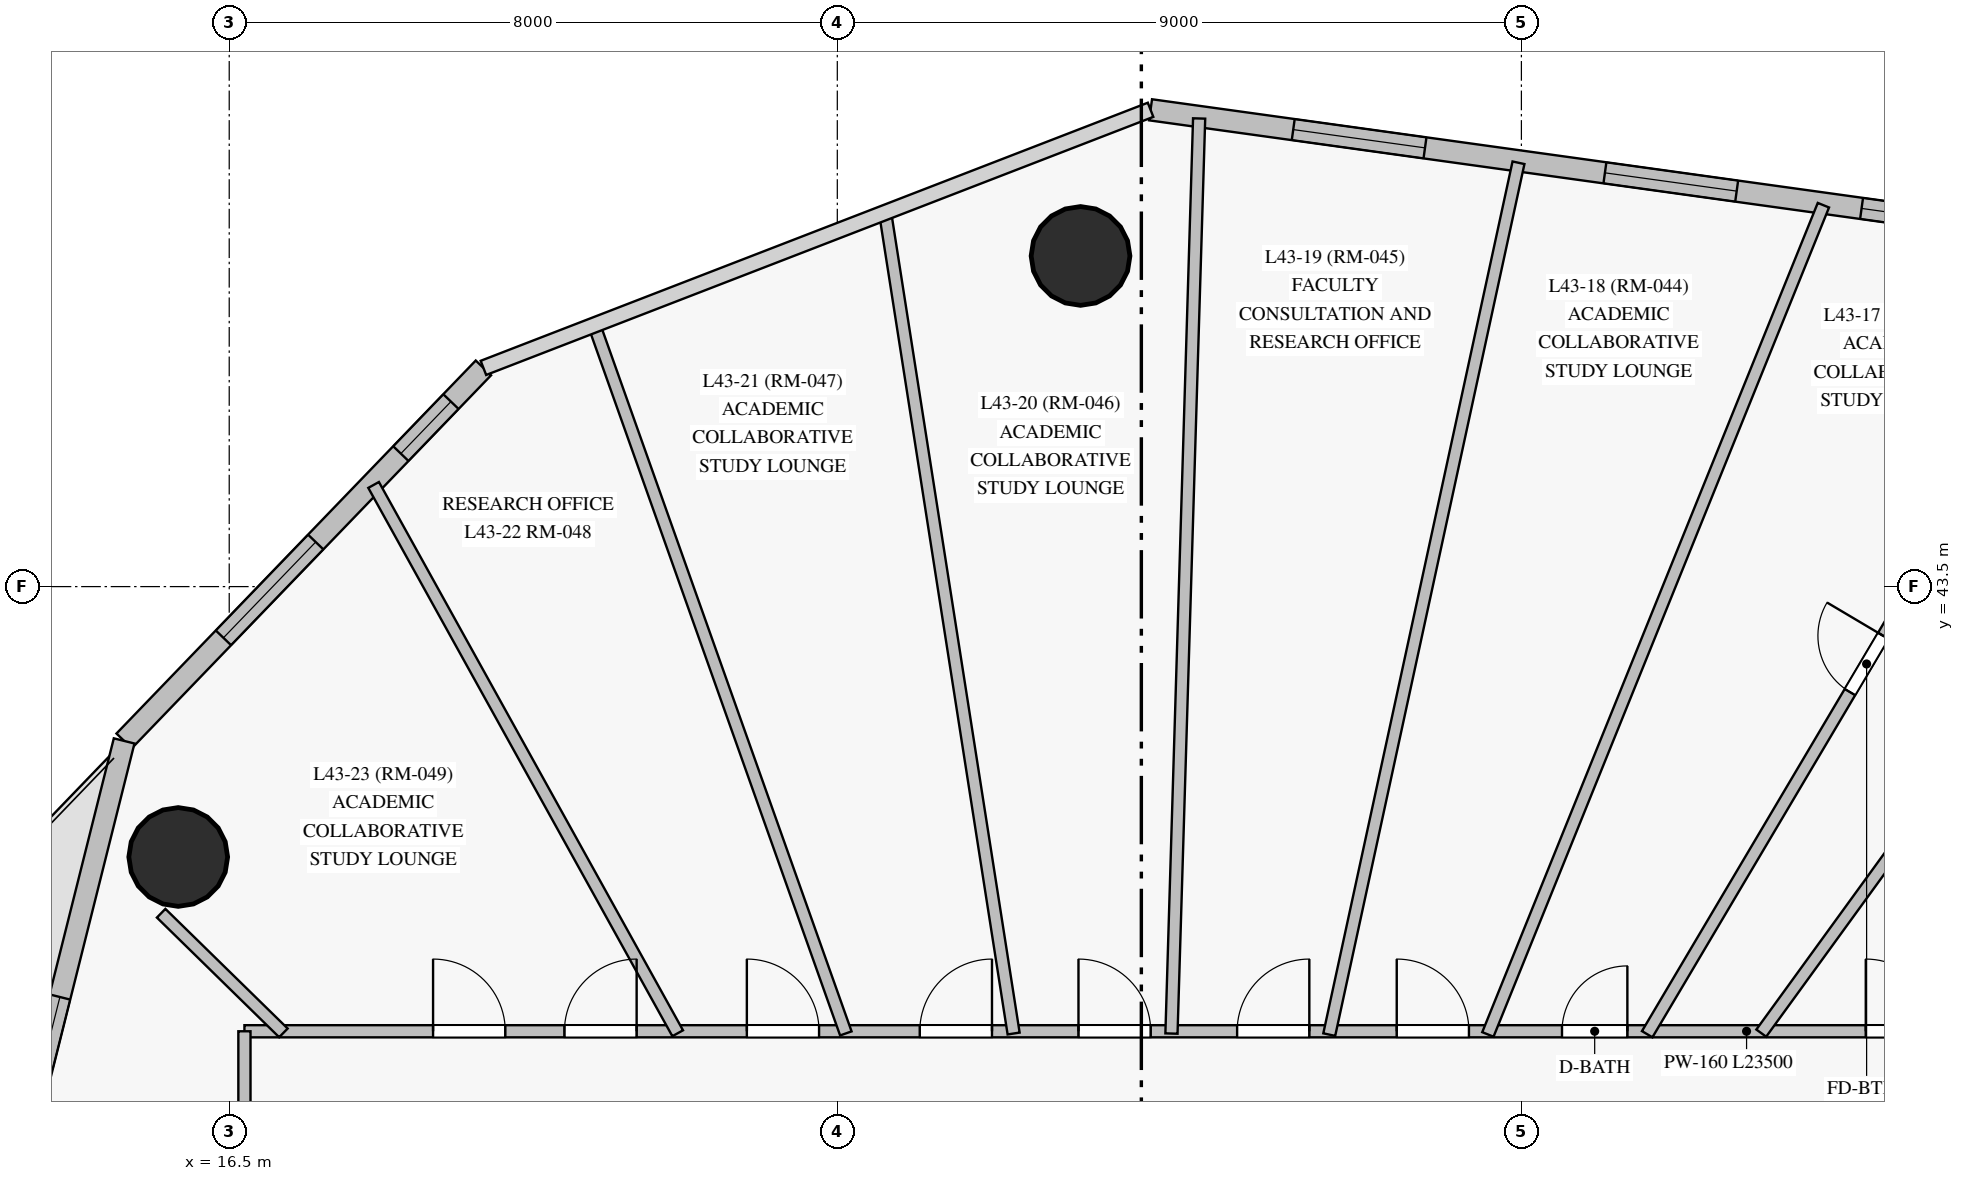
"""IFC4 building model, lengths in metres.
Left out: names, types, materials, properties, quantities, classifications, styles, units other than length and angle.
Written with IfcOpenShell. Run it as: python <this file> out.ifc"""

import sys

from ifc_helpers import new_model, si_unit, direction, frame, frame_2d, origin, origin_with_axes, origin_2d, place, context, subcontext, project, spatial, rectangle, circle, extrude, source, transform, mapped, element, fill, save


model = new_model("IFC4")
c1 = context("Model", 3, precision=1e-05, world=origin(), true_north=direction((0.0, 1.0)))
c2 = subcontext(c1, "Body", "Model", "MODEL_VIEW")
j1 = project(units=[si_unit("LENGTHUNIT", "METRE"), si_unit("PLANEANGLEUNIT", "RADIAN")], contexts=[c1])
p1 = place(None, origin())
s1 = spatial("IfcSite", under=j1, at=p1, CompositionType="ELEMENT")
p2 = place(p1, origin())
s2 = spatial("IfcBuilding", under=s1, at=p2, CompositionType="ELEMENT")
p3 = place(p2, frame((0.0, 0.0, 152.55)))
s3 = spatial("IfcBuildingStorey", under=s2, at=p3, CompositionType="ELEMENT", Elevation=152.55)
m1 = source(origin_with_axes(), c2, "Body", "SweptSolid", [
    extrude(circle(Radius=0.65, at=origin_2d()), origin(), (0.0, 0.0, 1.0), 4.0),
])
for number, where, z_axis, x_axis in (
    (1, (27.7, 47.85, 0.0), (0.0, 0.0, 1.0), (1.0, 0.0, 0.0)),
    (2, (15.829, 39.943, 0.0), (0.0, 0.0, 1.0), (1.0, 0.0, 0.0)),
):
    element("IfcColumn", number, at=place(p3, frame(where, z_axis=z_axis, x_axis=x_axis)), inside=s3, PredefinedType="COLUMN", context=c2, shape_type="MappedRepresentation", body=[
        mapped(m1, transform((0.0, 0.0, 0.0), scale=1.0)),
    ])
p4 = place(p3, frame((40.275, 48.156, 0.0), z_axis=(0.0, 0.0, 1.0), x_axis=(-0.990517311094, 0.137387977726, 0.0)))
e3 = element("IfcWall", 3, at=p4, inside=s3, PredefinedType="SOLIDWALL", context=c2, shape_type="SweptSolid", body=[
    extrude(rectangle(XDim=11.766, YDim=0.28, at=frame_2d((5.883, 0.0))), origin(), (0.0, 0.0, 1.0), 3.775),
])
p5 = place(p4, frame((0.572, 0.0, 0.85)))
e4 = element("IfcOpeningElement", 4, at=p5, cuts=e3, PredefinedType="OPENING", context=c2, shape_type="SweptSolid", body=[
    extrude(rectangle(XDim=1.75, YDim=1.65, at=frame_2d((0.875, 0.825))), frame((0.0, 0.15, 0.0), z_axis=(0.0, -1.0, 0.0), x_axis=(1.0, 0.0, 0.0)), (0.0, 0.0, 1.0), 0.3),
])
p6 = place(p4, frame((3.981, 0.0, 0.85)))
e5 = element("IfcOpeningElement", 5, at=p6, cuts=e3, PredefinedType="OPENING", context=c2, shape_type="SweptSolid", body=[
    extrude(rectangle(XDim=1.75, YDim=1.65, at=frame_2d((0.875, 0.825))), frame((0.0, 0.15, 0.0), z_axis=(0.0, -1.0, 0.0), x_axis=(1.0, 0.0, 0.0)), (0.0, 0.0, 1.0), 0.3),
])
p7 = place(p4, frame((8.121, 0.0, 0.85)))
e6 = element("IfcOpeningElement", 6, at=p7, cuts=e3, PredefinedType="OPENING", context=c2, shape_type="SweptSolid", body=[
    extrude(rectangle(XDim=1.75, YDim=1.65, at=frame_2d((0.875, 0.825))), frame((0.0, 0.15, 0.0), z_axis=(0.0, -1.0, 0.0), x_axis=(1.0, 0.0, 0.0)), (0.0, 0.0, 1.0), 0.3),
])
p8 = place(p3, frame((19.844, 46.377, 0.0), z_axis=(0.0, 0.0, 1.0), x_axis=(-0.69372431488, -0.720240636833, 0.0)))
e7 = element("IfcWall", 7, at=p8, inside=s3, PredefinedType="SOLIDWALL", context=c2, shape_type="SweptSolid", body=[
    extrude(rectangle(XDim=6.813, YDim=0.28, at=frame_2d((3.407, 0.0))), origin(), (0.0, 0.0, 1.0), 3.775),
])
p9 = place(p8, frame((0.616, 0.0, 0.85)))
e8 = element("IfcOpeningElement", 8, at=p9, cuts=e7, PredefinedType="OPENING", context=c2, shape_type="SweptSolid", body=[
    extrude(rectangle(XDim=0.95, YDim=1.5, at=frame_2d((0.475, 0.75))), frame((0.0, 0.15, 0.0), z_axis=(0.0, -1.0, 0.0), x_axis=(1.0, 0.0, 0.0)), (0.0, 0.0, 1.0), 0.3),
])
p10 = place(p8, frame((3.18, 0.0, 0.85)))
e9 = element("IfcOpeningElement", 9, at=p10, cuts=e7, PredefinedType="OPENING", context=c2, shape_type="SweptSolid", body=[
    extrude(rectangle(XDim=1.75, YDim=1.65, at=frame_2d((0.875, 0.825))), frame((0.0, 0.15, 0.0), z_axis=(0.0, -1.0, 0.0), x_axis=(1.0, 0.0, 0.0)), (0.0, 0.0, 1.0), 0.3),
])
p11 = place(p3, frame((15.117, 41.47, 0.0), z_axis=(0.0, 0.0, 1.0), x_axis=(-0.243272448764, -0.96995799686, 0.0)))
e10 = element("IfcWall", 10, at=p11, inside=s3, PredefinedType="SOLIDWALL", context=c2, shape_type="SweptSolid", body=[
    extrude(rectangle(XDim=22.529, YDim=0.28, at=frame_2d((11.265, 0.0))), origin(), (0.0, 0.0, 1.0), 3.445),
])
p12 = place(p11, frame((3.473, 0.0, 0.85)))
e11 = element("IfcOpeningElement", 11, at=p12, cuts=e10, PredefinedType="OPENING", context=c2, shape_type="SweptSolid", body=[
    extrude(rectangle(XDim=0.95, YDim=1.5, at=frame_2d((0.475, 0.75))), frame((0.0, 0.15, 0.0), z_axis=(0.0, -1.0, 0.0), x_axis=(1.0, 0.0, 0.0)), (0.0, 0.0, 1.0), 0.3),
])
p13 = place(p11, frame((12.108, 0.0, 0.85)))
e12 = element("IfcOpeningElement", 12, at=p13, cuts=e10, PredefinedType="OPENING", context=c2, shape_type="SweptSolid", body=[
    extrude(rectangle(XDim=1.75, YDim=1.65, at=frame_2d((0.875, 0.825))), frame((0.0, 0.15, 0.0), z_axis=(0.0, -1.0, 0.0), x_axis=(1.0, 0.0, 0.0)), (0.0, 0.0, 1.0), 0.3),
])
p14 = place(p11, frame((17.049, 0.0, 0.85)))
e13 = element("IfcOpeningElement", 13, at=p14, cuts=e10, PredefinedType="OPENING", context=c2, shape_type="SweptSolid", body=[
    extrude(rectangle(XDim=1.75, YDim=1.65, at=frame_2d((0.875, 0.825))), frame((0.0, 0.15, 0.0), z_axis=(0.0, -1.0, 0.0), x_axis=(1.0, 0.0, 0.0)), (0.0, 0.0, 1.0), 0.3),
])
p15 = place(p11, frame((9.801, 0.0, 0.0)))
e14 = element("IfcOpeningElement", 14, at=p15, cuts=e10, PredefinedType="OPENING", context=c2, shape_type="SweptSolid", body=[
    extrude(rectangle(XDim=1.05, YDim=2.12, at=frame_2d((0.525, 1.06))), frame((0.0, 0.15, 0.0), z_axis=(0.0, -1.0, 0.0), x_axis=(1.0, 0.0, 0.0)), (0.0, 0.0, 1.0), 0.3),
])
p16 = place(p3, frame((16.7, 37.65, 0.0), z_axis=(0.0, 0.0, 1.0), x_axis=(1.0, 0.0, 0.0)))
e15 = element("IfcWall", 15, at=p16, inside=s3, PredefinedType="PARTITIONING", context=c2, shape_type="SweptSolid", body=[
    extrude(rectangle(XDim=23.5, YDim=0.16, at=frame_2d((11.75, 0.0))), origin(), (0.0, 0.0, 1.0), 3.325),
])
p17 = place(p16, frame((21.331, 0.0, 0.0)))
e16 = element("IfcOpeningElement", 16, at=p17, cuts=e15, PredefinedType="OPENING", context=c2, shape_type="SweptSolid", body=[
    extrude(rectangle(XDim=0.95, YDim=2.15, at=frame_2d((0.475, 1.075))), frame((0.0, 0.09, 0.0), z_axis=(0.0, -1.0, 0.0), x_axis=(1.0, 0.0, 0.0)), (0.0, 0.0, 1.0), 0.18),
])
p18 = place(p16, frame((17.334, 0.0, 0.0)))
e17 = element("IfcOpeningElement", 17, at=p18, cuts=e15, PredefinedType="OPENING", context=c2, shape_type="SweptSolid", body=[
    extrude(rectangle(XDim=0.86, YDim=2.1, at=frame_2d((0.43, 1.05))), frame((0.0, 0.09, 0.0), z_axis=(0.0, -1.0, 0.0), x_axis=(1.0, 0.0, 0.0)), (0.0, 0.0, 1.0), 0.18),
])
p19 = place(p16, frame((15.16, 0.0, 0.0)))
e18 = element("IfcOpeningElement", 18, at=p19, cuts=e15, PredefinedType="OPENING", context=c2, shape_type="SweptSolid", body=[
    extrude(rectangle(XDim=0.95, YDim=2.15, at=frame_2d((0.475, 1.075))), frame((0.0, 0.09, 0.0), z_axis=(0.0, -1.0, 0.0), x_axis=(1.0, 0.0, 0.0)), (0.0, 0.0, 1.0), 0.18),
])
p20 = place(p16, frame((13.06, 0.0, 0.0)))
e19 = element("IfcOpeningElement", 19, at=p20, cuts=e15, PredefinedType="OPENING", context=c2, shape_type="SweptSolid", body=[
    extrude(rectangle(XDim=0.95, YDim=2.15, at=frame_2d((0.475, 1.075))), frame((0.0, 0.09, 0.0), z_axis=(0.0, -1.0, 0.0), x_axis=(1.0, 0.0, 0.0)), (0.0, 0.0, 1.0), 0.18),
])
p21 = place(p16, frame((10.973, 0.0, 0.0)))
e20 = element("IfcOpeningElement", 20, at=p21, cuts=e15, PredefinedType="OPENING", context=c2, shape_type="SweptSolid", body=[
    extrude(rectangle(XDim=0.95, YDim=2.15, at=frame_2d((0.475, 1.075))), frame((0.0, 0.09, 0.0), z_axis=(0.0, -1.0, 0.0), x_axis=(1.0, 0.0, 0.0)), (0.0, 0.0, 1.0), 0.18),
])
p22 = place(p16, frame((8.885, 0.0, 0.0)))
e21 = element("IfcOpeningElement", 21, at=p22, cuts=e15, PredefinedType="OPENING", context=c2, shape_type="SweptSolid", body=[
    extrude(rectangle(XDim=0.95, YDim=2.15, at=frame_2d((0.475, 1.075))), frame((0.0, 0.09, 0.0), z_axis=(0.0, -1.0, 0.0), x_axis=(1.0, 0.0, 0.0)), (0.0, 0.0, 1.0), 0.18),
])
p23 = place(p16, frame((6.61, 0.0, 0.0)))
e22 = element("IfcOpeningElement", 22, at=p23, cuts=e15, PredefinedType="OPENING", context=c2, shape_type="SweptSolid", body=[
    extrude(rectangle(XDim=0.95, YDim=2.15, at=frame_2d((0.475, 1.075))), frame((0.0, 0.09, 0.0), z_axis=(0.0, -1.0, 0.0), x_axis=(1.0, 0.0, 0.0)), (0.0, 0.0, 1.0), 0.18),
])
p24 = place(p16, frame((4.21, 0.0, 0.0)))
e23 = element("IfcOpeningElement", 23, at=p24, cuts=e15, PredefinedType="OPENING", context=c2, shape_type="SweptSolid", body=[
    extrude(rectangle(XDim=0.95, YDim=2.15, at=frame_2d((0.475, 1.075))), frame((0.0, 0.09, 0.0), z_axis=(0.0, -1.0, 0.0), x_axis=(1.0, 0.0, 0.0)), (0.0, 0.0, 1.0), 0.18),
])
p25 = place(p16, frame((2.482, 0.0, 0.0)))
e24 = element("IfcOpeningElement", 24, at=p25, cuts=e15, PredefinedType="OPENING", context=c2, shape_type="SweptSolid", body=[
    extrude(rectangle(XDim=0.95, YDim=2.15, at=frame_2d((0.475, 1.075))), frame((0.0, 0.09, 0.0), z_axis=(0.0, -1.0, 0.0), x_axis=(1.0, 0.0, 0.0)), (0.0, 0.0, 1.0), 0.18),
])
p26 = place(p3, frame((16.7, 15.35, 0.0), z_axis=(0.0, 0.0, 1.0), x_axis=(0.0, 1.0, 0.0)))
e25 = element("IfcWall", 25, at=p26, inside=s3, PredefinedType="PARTITIONING", context=c2, shape_type="SweptSolid", body=[
    extrude(rectangle(XDim=22.3, YDim=0.16, at=frame_2d((11.15, 0.0))), origin(), (0.0, 0.0, 1.0), 2.975),
])
p27 = place(p26, frame((7.33, 0.0, 0.0)))
e26 = element("IfcOpeningElement", 26, at=p27, cuts=e25, PredefinedType="OPENING", context=c2, shape_type="SweptSolid", body=[
    extrude(rectangle(XDim=0.95, YDim=2.15, at=frame_2d((0.475, 1.075))), frame((0.0, 0.09, 0.0), z_axis=(0.0, -1.0, 0.0), x_axis=(1.0, 0.0, 0.0)), (0.0, 0.0, 1.0), 0.18),
])
p28 = place(p26, frame((5.1, 0.0, 0.0)))
e27 = element("IfcOpeningElement", 27, at=p28, cuts=e25, PredefinedType="OPENING", context=c2, shape_type="SweptSolid", body=[
    extrude(rectangle(XDim=0.96, YDim=2.15, at=frame_2d((0.48, 1.075))), frame((0.0, 0.09, 0.0), z_axis=(0.0, -1.0, 0.0), x_axis=(1.0, 0.0, 0.0)), (0.0, 0.0, 1.0), 0.18),
])
p29 = place(p26, frame((1.328, 0.0, 0.0)))
e28 = element("IfcOpeningElement", 28, at=p29, cuts=e25, PredefinedType="OPENING", context=c2, shape_type="SweptSolid", body=[
    extrude(rectangle(XDim=0.95, YDim=2.15, at=frame_2d((0.475, 1.075))), frame((0.0, 0.09, 0.0), z_axis=(0.0, -1.0, 0.0), x_axis=(1.0, 0.0, 0.0)), (0.0, 0.0, 1.0), 0.18),
])
p30 = place(p26, frame((14.02, 0.0, 0.0)))
e29 = element("IfcOpeningElement", 29, at=p30, cuts=e25, PredefinedType="OPENING", context=c2, shape_type="SweptSolid", body=[
    extrude(rectangle(XDim=0.95, YDim=2.15, at=frame_2d((0.475, 1.075))), frame((0.0, 0.09, 0.0), z_axis=(0.0, -1.0, 0.0), x_axis=(1.0, 0.0, 0.0)), (0.0, 0.0, 1.0), 0.18),
])
p31 = place(p3, frame((28.896, 37.62, 0.0), z_axis=(0.0, 0.0, 1.0), x_axis=(0.030223460997, 0.999543166854, 0.0)))
e30 = element("IfcWall", 30, at=p31, inside=s3, PredefinedType="PARTITIONING", context=c2, shape_type="SweptSolid", body=[
    extrude(rectangle(XDim=12.044, YDim=0.16, at=frame_2d((6.022, 0.0))), origin(), (0.0, 0.0, 1.0), 3.775),
])
p32 = place(p3, frame((33.059, 37.608, 0.0), z_axis=(0.0, 0.0, 1.0), x_axis=(0.375071800274, 0.926995763011, 0.0)))
e31 = element("IfcWall", 31, at=p32, inside=s3, PredefinedType="PARTITIONING", context=c2, shape_type="SweptSolid", body=[
    extrude(rectangle(XDim=11.769, YDim=0.16, at=frame_2d((5.884, 0.0))), origin(), (0.0, 0.0, 1.0), 3.775),
])
p33 = place(p3, frame((30.972, 37.606, 0.0), z_axis=(0.0, 0.0, 1.0), x_axis=(0.212126520702, 0.97724221113, 0.0)))
e32 = element("IfcWall", 32, at=p33, inside=s3, PredefinedType="PARTITIONING", context=c2, shape_type="SweptSolid", body=[
    extrude(rectangle(XDim=11.737, YDim=0.16, at=frame_2d((5.869, 0.0))), origin(), (0.0, 0.0, 1.0), 3.775),
])
p34 = place(p3, frame((35.155, 37.611, 0.0), z_axis=(0.0, 0.0, 1.0), x_axis=(0.509830756174, 0.860274723597, 0.0)))
e33 = element("IfcWall", 33, at=p34, inside=s3, PredefinedType="PARTITIONING", context=c2, shape_type="SweptSolid", body=[
    extrude(rectangle(XDim=11.324, YDim=0.16, at=frame_2d((5.662, 0.0))), origin(), (0.0, 0.0, 1.0), 3.775),
])
p35 = place(p34, frame((5.232, 0.0, 0.0)))
e34 = element("IfcOpeningElement", 34, at=p35, cuts=e33, PredefinedType="OPENING", context=c2, shape_type="SweptSolid", body=[
    extrude(rectangle(XDim=0.86, YDim=2.04, at=frame_2d((0.43, 1.02))), frame((0.0, 0.09, 0.0), z_axis=(0.0, -1.0, 0.0), x_axis=(1.0, 0.0, 0.0)), (0.0, 0.0, 1.0), 0.18),
])
p36 = place(p3, frame((26.82, 37.62, 0.0), z_axis=(0.0, 0.0, 1.0), x_axis=(-0.154665737916, 0.987966856486, 0.0)))
e35 = element("IfcWall", 35, at=p36, inside=s3, PredefinedType="PARTITIONING", context=c2, shape_type="SweptSolid", body=[
    extrude(rectangle(XDim=10.906, YDim=0.16, at=frame_2d((5.453, 0.0))), origin(), (0.0, 0.0, 1.0), 2.975),
])
p37 = place(p3, frame((24.612, 37.622, 0.0), z_axis=(0.0, 0.0, 1.0), x_axis=(-0.334765052353, 0.942301628845, 0.0)))
e36 = element("IfcWall", 36, at=p37, inside=s3, PredefinedType="PARTITIONING", context=c2, shape_type="SweptSolid", body=[
    extrude(rectangle(XDim=9.865, YDim=0.16, at=frame_2d((4.933, 0.0))), origin(), (0.0, 0.0, 1.0), 3.775),
])
p38 = place(p3, frame((36.656, 37.626, 0.0), z_axis=(0.0, 0.0, 1.0), x_axis=(0.587701388375, 0.809077918437, 0.0)))
e37 = element("IfcWall", 37, at=p38, inside=s3, PredefinedType="PARTITIONING", context=c2, shape_type="SweptSolid", body=[
    extrude(rectangle(XDim=9.848, YDim=0.16, at=frame_2d((4.924, 0.0))), origin(), (0.0, 0.0, 1.0), 3.775),
])
p39 = place(p3, frame((22.4, 37.624, 0.0), z_axis=(0.0, 0.0, 1.0), x_axis=(-0.484964263247, 0.87453396925, 0.0)))
e38 = element("IfcWall", 38, at=p39, inside=s3, PredefinedType="PARTITIONING", context=c2, shape_type="SweptSolid", body=[
    extrude(rectangle(XDim=8.249, YDim=0.16, at=frame_2d((4.124, 0.0))), origin(), (0.0, 0.0, 1.0), 3.775),
])
p40 = place(p3, frame((17.213, 37.629, 0.0), z_axis=(0.0, 0.0, 1.0), x_axis=(-0.71471376476, 0.699417067609, 0.0)))
e39 = element("IfcWall", 39, at=p40, inside=s3, PredefinedType="PARTITIONING", context=c2, shape_type="SweptSolid", body=[
    extrude(rectangle(XDim=2.25, YDim=0.16, at=frame_2d((1.125, 0.0))), origin(), (0.0, 0.0, 1.0), 2.975),
])
m2 = source(origin_with_axes(), c2, "Body", "SweptSolid", [
    extrude(rectangle(XDim=1.75, YDim=1.65, at=frame_2d((0.875, 0.825))), frame((0.0, 0.03, 0.0), z_axis=(0.0, -1.0, 0.0), x_axis=(1.0, 0.0, 0.0)), (0.0, 0.0, 1.0), 0.06),
])
p41 = place(p5, origin())
e40 = element("IfcWindow", 40, at=p41, inside=s3, PartitioningType="SINGLE_PANEL", PredefinedType="WINDOW", context=c2, shape_type="MappedRepresentation", body=[
    mapped(m2, transform((0.0, 0.0, 0.0), scale=1.0)),
])
fill(e4, e40)
p42 = place(p6, origin())
e41 = element("IfcWindow", 41, at=p42, inside=s3, PartitioningType="SINGLE_PANEL", PredefinedType="WINDOW", context=c2, shape_type="MappedRepresentation", body=[
    mapped(m2, transform((0.0, 0.0, 0.0), scale=1.0)),
])
fill(e5, e41)
p43 = place(p7, origin())
e42 = element("IfcWindow", 42, at=p43, inside=s3, PartitioningType="SINGLE_PANEL", PredefinedType="WINDOW", context=c2, shape_type="MappedRepresentation", body=[
    mapped(m2, transform((0.0, 0.0, 0.0), scale=1.0)),
])
fill(e6, e42)
m3 = source(origin_with_axes(), c2, "Body", "SweptSolid", [
    extrude(rectangle(XDim=0.95, YDim=1.5, at=frame_2d((0.475, 0.75))), frame((0.0, 0.03, 0.0), z_axis=(0.0, -1.0, 0.0), x_axis=(1.0, 0.0, 0.0)), (0.0, 0.0, 1.0), 0.06),
])
p44 = place(p9, origin())
e43 = element("IfcWindow", 43, at=p44, inside=s3, PartitioningType="SINGLE_PANEL", PredefinedType="WINDOW", context=c2, shape_type="MappedRepresentation", body=[
    mapped(m3, transform((0.0, 0.0, 0.0), scale=1.0)),
])
fill(e8, e43)
p45 = place(p10, origin())
e44 = element("IfcWindow", 44, at=p45, inside=s3, PartitioningType="SINGLE_PANEL", PredefinedType="WINDOW", context=c2, shape_type="MappedRepresentation", body=[
    mapped(m2, transform((0.0, 0.0, 0.0), scale=1.0)),
])
fill(e9, e44)
p46 = place(p12, origin())
e45 = element("IfcWindow", 45, at=p46, inside=s3, PartitioningType="SINGLE_PANEL", PredefinedType="WINDOW", context=c2, shape_type="MappedRepresentation", body=[
    mapped(m3, transform((0.0, 0.0, 0.0), scale=1.0)),
])
fill(e11, e45)
m4 = source(origin_with_axes(), c2, "Body", "SweptSolid", [
    extrude(rectangle(XDim=0.95, YDim=2.15, at=frame_2d((0.475, 1.075))), frame((0.0, 0.025, 0.0), z_axis=(0.0, -1.0, 0.0), x_axis=(1.0, 0.0, 0.0)), (0.0, 0.0, 1.0), 0.05),
])
p47 = place(p17, origin())
e46 = element("IfcDoor", 46, at=p47, inside=s3, OperationType="SINGLE_SWING_LEFT", PredefinedType="DOOR", context=c2, shape_type="MappedRepresentation", body=[
    mapped(m4, transform((0.0, 0.0, 0.0), scale=1.0)),
])
fill(e16, e46)
m5 = source(origin_with_axes(), c2, "Body", "SweptSolid", [
    extrude(rectangle(XDim=0.86, YDim=2.1, at=frame_2d((0.43, 1.05))), frame((0.0, 0.025, 0.0), z_axis=(0.0, -1.0, 0.0), x_axis=(1.0, 0.0, 0.0)), (0.0, 0.0, 1.0), 0.05),
])
p48 = place(p18, origin())
e47 = element("IfcDoor", 47, at=p48, inside=s3, OperationType="SINGLE_SWING_RIGHT", PredefinedType="DOOR", context=c2, shape_type="MappedRepresentation", body=[
    mapped(m5, transform((0.0, 0.0, 0.0), scale=1.0)),
])
fill(e17, e47)
p49 = place(p19, origin())
e48 = element("IfcDoor", 48, at=p49, inside=s3, OperationType="SINGLE_SWING_LEFT", PredefinedType="DOOR", context=c2, shape_type="MappedRepresentation", body=[
    mapped(m4, transform((0.0, 0.0, 0.0), scale=1.0)),
])
fill(e18, e48)
p50 = place(p20, origin())
e49 = element("IfcDoor", 49, at=p50, inside=s3, OperationType="SINGLE_SWING_RIGHT", PredefinedType="DOOR", context=c2, shape_type="MappedRepresentation", body=[
    mapped(m4, transform((0.0, 0.0, 0.0), scale=1.0)),
])
fill(e19, e49)
p51 = place(p21, origin())
e50 = element("IfcDoor", 50, at=p51, inside=s3, OperationType="SINGLE_SWING_LEFT", PredefinedType="DOOR", context=c2, shape_type="MappedRepresentation", body=[
    mapped(m4, transform((0.0, 0.0, 0.0), scale=1.0)),
])
fill(e20, e50)
p52 = place(p22, origin())
e51 = element("IfcDoor", 51, at=p52, inside=s3, OperationType="SINGLE_SWING_RIGHT", PredefinedType="DOOR", context=c2, shape_type="MappedRepresentation", body=[
    mapped(m4, transform((0.0, 0.0, 0.0), scale=1.0)),
])
fill(e21, e51)
p53 = place(p23, origin())
e52 = element("IfcDoor", 52, at=p53, inside=s3, OperationType="SINGLE_SWING_LEFT", PredefinedType="DOOR", context=c2, shape_type="MappedRepresentation", body=[
    mapped(m4, transform((0.0, 0.0, 0.0), scale=1.0)),
])
fill(e22, e52)
p54 = place(p24, origin())
e53 = element("IfcDoor", 53, at=p54, inside=s3, OperationType="SINGLE_SWING_RIGHT", PredefinedType="DOOR", context=c2, shape_type="MappedRepresentation", body=[
    mapped(m4, transform((0.0, 0.0, 0.0), scale=1.0)),
])
fill(e23, e53)
p55 = place(p25, origin())
e54 = element("IfcDoor", 54, at=p55, inside=s3, OperationType="SINGLE_SWING_LEFT", PredefinedType="DOOR", context=c2, shape_type="MappedRepresentation", body=[
    mapped(m4, transform((0.0, 0.0, 0.0), scale=1.0)),
])
fill(e24, e54)
m6 = source(origin_with_axes(), c2, "Body", "SweptSolid", [
    extrude(rectangle(XDim=0.86, YDim=2.04, at=frame_2d((0.43, 1.02))), frame((0.0, 0.025, 0.0), z_axis=(0.0, -1.0, 0.0), x_axis=(1.0, 0.0, 0.0)), (0.0, 0.0, 1.0), 0.05),
])
p56 = place(p35, origin())
e55 = element("IfcDoor", 55, at=p56, inside=s3, OperationType="SINGLE_SWING_RIGHT", PredefinedType="DOOR", context=c2, shape_type="MappedRepresentation", body=[
    mapped(m6, transform((0.0, 0.0, 0.0), scale=1.0)),
])
fill(e34, e55)
save(model, sys.argv[1])
